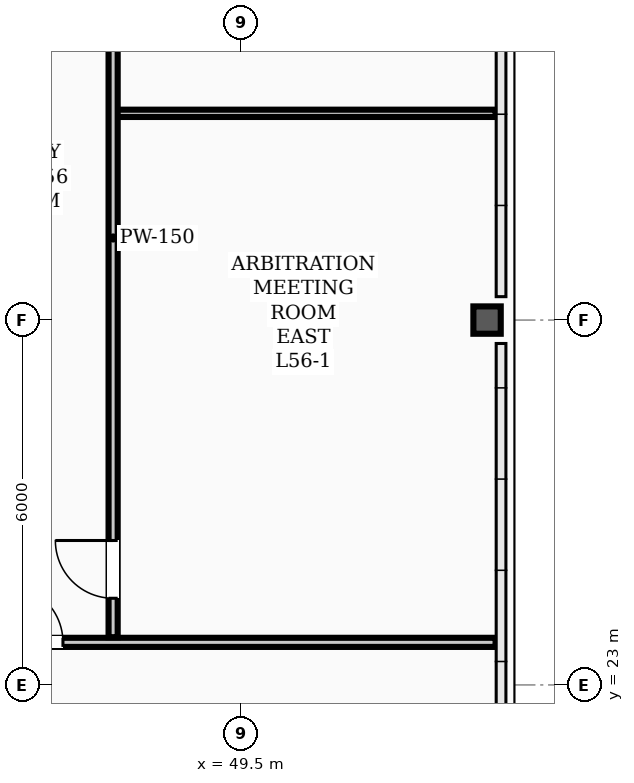
"""IFC4 building model, lengths in metres.
Left out: names, types, materials, properties, quantities, classifications, styles, units other than length and angle.
Written with IfcOpenShell. Run it as: python <this file> out.ifc"""

import sys

from ifc_helpers import new_model, si_unit, direction, frame, frame_2d, origin, origin_2d, place, context, subcontext, project, spatial, rectangle, hollow_rectangle, extrude, element, fill, save


model = new_model("IFC4")
c1 = context("Model", 3, precision=1e-05, world=origin(), true_north=direction((0.0, 1.0)))
c2 = subcontext(c1, "Body", "Model", "MODEL_VIEW")
j1 = project(units=[si_unit("LENGTHUNIT", "METRE"), si_unit("PLANEANGLEUNIT", "RADIAN")], contexts=[c1])
p1 = place(None, origin())
s1 = spatial("IfcSite", under=j1, at=p1, CompositionType="ELEMENT")
p2 = place(p1, origin())
s2 = spatial("IfcBuilding", under=s1, at=p2, CompositionType="ELEMENT")
p3 = place(p2, frame((0.0, 0.0, 226.7)))
s3 = spatial("IfcBuildingStorey", under=s2, at=p3, CompositionType="ELEMENT", Elevation=226.7)
p4 = place(p3, frame((53.55, 29.0, 0.0), z_axis=(0.0, 0.0, 1.0), x_axis=(1.0, 0.0, 0.0)))
e1 = element("IfcColumn", 1, at=p4, inside=s3, PredefinedType="COLUMN", context=c2, shape_type="SweptSolid", body=[
    extrude(hollow_rectangle(XDim=0.45, YDim=0.45, WallThickness=0.022, InnerFilletRadius=0.022, OuterFilletRadius=0.044, at=origin_2d()), origin(), (0.0, 0.0, 1.0), 3.66),
])
p5 = place(p3, frame((10.31, 23.7, 0.0), z_axis=(0.0, 0.0, 1.0), x_axis=(1.0, 0.0, 0.0)))
e2 = element("IfcWall", 2, at=p5, inside=s3, PredefinedType="PARTITIONING", context=c2, shape_type="SweptSolid", body=[
    extrude(rectangle(XDim=43.38, YDim=0.15, at=frame_2d((21.69, 0.0))), origin(), (0.0, 0.0, 1.0), 2.24),
])
p6 = place(p5, frame((0.575, 0.0, 0.0)))
e3 = element("IfcOpeningElement", 3, at=p6, cuts=e2, PredefinedType="OPENING", context=c2, shape_type="SweptSolid", body=[
    extrude(rectangle(XDim=0.95, YDim=2.08, at=frame_2d((0.475, 1.04))), frame((0.0, 0.085, 0.0), z_axis=(0.0, -1.0, 0.0), x_axis=(1.0, 0.0, 0.0)), (0.0, 0.0, 1.0), 0.17),
])
p7 = place(p5, frame((9.615, 0.0, 0.0)))
e4 = element("IfcOpeningElement", 4, at=p7, cuts=e2, PredefinedType="OPENING", context=c2, shape_type="SweptSolid", body=[
    extrude(rectangle(XDim=0.95, YDim=2.08, at=frame_2d((0.475, 1.04))), frame((0.0, 0.085, 0.0), z_axis=(0.0, -1.0, 0.0), x_axis=(1.0, 0.0, 0.0)), (0.0, 0.0, 1.0), 0.17),
])
p8 = place(p5, frame((16.215, 0.0, 0.0)))
e5 = element("IfcOpeningElement", 5, at=p8, cuts=e2, PredefinedType="OPENING", context=c2, shape_type="SweptSolid", body=[
    extrude(rectangle(XDim=0.95, YDim=2.08, at=frame_2d((0.475, 1.04))), frame((0.0, 0.085, 0.0), z_axis=(0.0, -1.0, 0.0), x_axis=(1.0, 0.0, 0.0)), (0.0, 0.0, 1.0), 0.17),
])
p9 = place(p5, frame((22.815, 0.0, 0.0)))
e6 = element("IfcOpeningElement", 6, at=p9, cuts=e2, PredefinedType="OPENING", context=c2, shape_type="SweptSolid", body=[
    extrude(rectangle(XDim=0.95, YDim=2.08, at=frame_2d((0.475, 1.04))), frame((0.0, 0.085, 0.0), z_axis=(0.0, -1.0, 0.0), x_axis=(1.0, 0.0, 0.0)), (0.0, 0.0, 1.0), 0.17),
])
p10 = place(p5, frame((29.115, 0.0, 0.0)))
e7 = element("IfcOpeningElement", 7, at=p10, cuts=e2, PredefinedType="OPENING", context=c2, shape_type="SweptSolid", body=[
    extrude(rectangle(XDim=0.95, YDim=2.08, at=frame_2d((0.475, 1.04))), frame((0.0, 0.085, 0.0), z_axis=(0.0, -1.0, 0.0), x_axis=(1.0, 0.0, 0.0)), (0.0, 0.0, 1.0), 0.17),
])
p11 = place(p5, frame((35.315, 0.0, 0.0)))
e8 = element("IfcOpeningElement", 8, at=p11, cuts=e2, PredefinedType="OPENING", context=c2, shape_type="SweptSolid", body=[
    extrude(rectangle(XDim=0.95, YDim=2.08, at=frame_2d((0.475, 1.04))), frame((0.0, 0.085, 0.0), z_axis=(0.0, -1.0, 0.0), x_axis=(1.0, 0.0, 0.0)), (0.0, 0.0, 1.0), 0.17),
])
p12 = place(p3, frame((47.4, 32.4, 0.0), z_axis=(0.0, 0.0, 1.0), x_axis=(1.0, 0.0, 0.0)))
e9 = element("IfcWall", 9, at=p12, inside=s3, PredefinedType="PARTITIONING", context=c2, shape_type="SweptSolid", body=[
    extrude(rectangle(XDim=6.29, YDim=0.12, at=frame_2d((3.145, 0.0))), origin(), (0.0, 0.0, 1.0), 3.66),
])
p13 = place(p3, frame((47.4, 23.785, 0.0), z_axis=(0.0, 0.0, 1.0), x_axis=(0.0, 1.0, 0.0)))
e10 = element("IfcWall", 10, at=p13, inside=s3, PredefinedType="PARTITIONING", context=c2, shape_type="SweptSolid", body=[
    extrude(rectangle(XDim=13.13, YDim=0.15, at=frame_2d((6.565, 0.0))), origin(), (0.0, 0.0, 1.0), 2.24),
])
p14 = place(p13, frame((0.64, 0.0, 0.0)))
e11 = element("IfcOpeningElement", 11, at=p14, cuts=e10, PredefinedType="OPENING", context=c2, shape_type="SweptSolid", body=[
    extrude(rectangle(XDim=0.95, YDim=2.08, at=frame_2d((0.475, 1.04))), frame((0.0, 0.085, 0.0), z_axis=(0.0, -1.0, 0.0), x_axis=(1.0, 0.0, 0.0)), (0.0, 0.0, 1.0), 0.17),
])
p15 = place(p13, frame((10.44, 0.0, 0.0)))
e12 = element("IfcOpeningElement", 12, at=p15, cuts=e10, PredefinedType="OPENING", context=c2, shape_type="SweptSolid", body=[
    extrude(rectangle(XDim=0.95, YDim=2.08, at=frame_2d((0.475, 1.04))), frame((0.0, 0.085, 0.0), z_axis=(0.0, -1.0, 0.0), x_axis=(1.0, 0.0, 0.0)), (0.0, 0.0, 1.0), 0.17),
])
p16 = place(p11, origin())
e13 = element("IfcDoor", 13, at=p16, inside=s3, OperationType="SINGLE_SWING_LEFT", PredefinedType="DOOR", context=c2, shape_type="SweptSolid", body=[
    extrude(rectangle(XDim=0.95, YDim=2.08, at=frame_2d((0.475, 1.04))), frame((0.0, 0.025, 0.0), z_axis=(0.0, -1.0, 0.0), x_axis=(1.0, 0.0, 0.0)), (0.0, 0.0, 1.0), 0.05),
])
fill(e8, e13)
p17 = place(p14, origin())
e14 = element("IfcDoor", 14, at=p17, inside=s3, OperationType="SINGLE_SWING_RIGHT", PredefinedType="DOOR", context=c2, shape_type="SweptSolid", body=[
    extrude(rectangle(XDim=0.95, YDim=2.08, at=frame_2d((0.475, 1.04))), frame((0.0, 0.025, 0.0), z_axis=(0.0, -1.0, 0.0), x_axis=(1.0, 0.0, 0.0)), (0.0, 0.0, 1.0), 0.05),
])
fill(e11, e14)
save(model, sys.argv[1])
